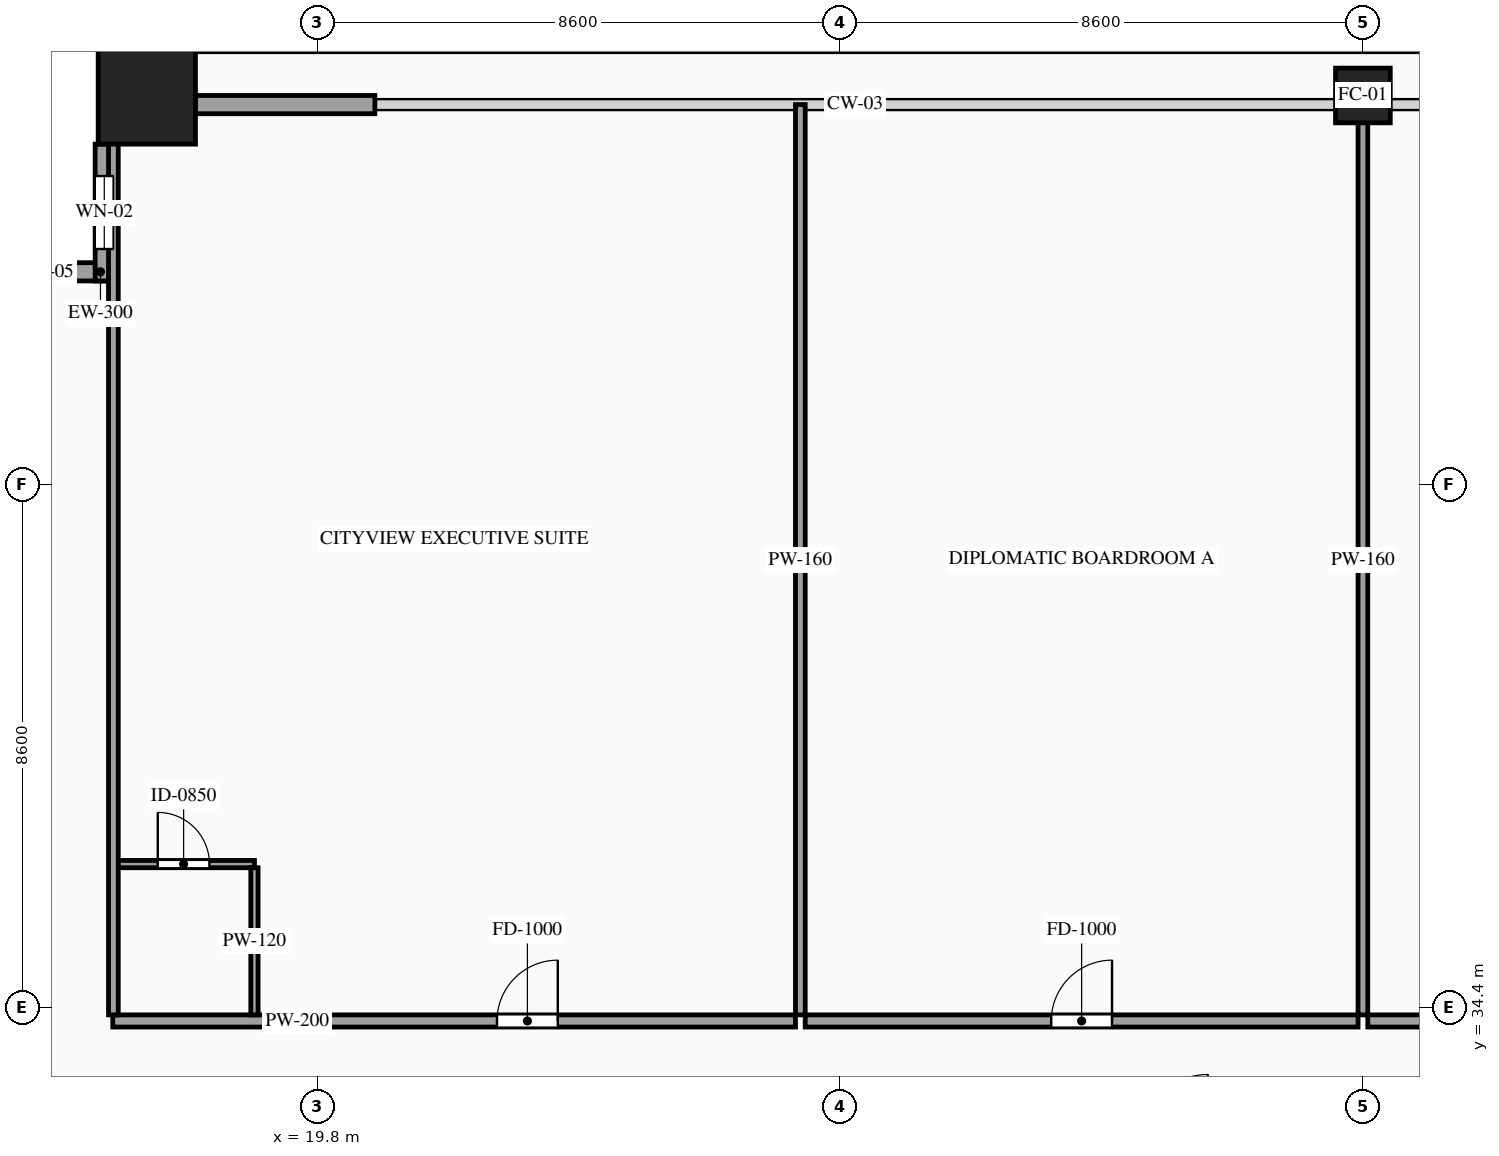
"""IFC4 building model, lengths in metres.
Left out: names, types, materials, properties, quantities, classifications, styles, units other than length and angle.
Written with IfcOpenShell. Run it as: python <this file> out.ifc"""

import sys

from ifc_helpers import new_model, si_unit, direction, frame, frame_2d, origin, origin_2d, place, context, subcontext, project, spatial, rectangle, hollow_rectangle, extrude, source, transform, mapped, element, fill, save


model = new_model("IFC4")
c1 = context("Model", 3, precision=1e-05, world=origin(), true_north=direction((0.0, 1.0)))
c2 = subcontext(c1, "Body", "Model", "MODEL_VIEW")
j1 = project(units=[si_unit("LENGTHUNIT", "METRE"), si_unit("PLANEANGLEUNIT", "RADIAN")], contexts=[c1])
p1 = place(None, origin())
s1 = spatial("IfcSite", under=j1, at=p1, CompositionType="ELEMENT")
p2 = place(p1, origin())
s2 = spatial("IfcBuilding", under=s1, at=p2, CompositionType="ELEMENT")
p3 = place(p2, frame((0.0, 0.0, 101.0)))
s3 = spatial("IfcBuildingStorey", under=s2, at=p3, CompositionType="ELEMENT", Elevation=101.0)
m1 = source(origin(), c2, "Body", "SweptSolid", [
    extrude(hollow_rectangle(XDim=1.6, YDim=1.6, WallThickness=0.07, at=origin_2d()), origin(), (0.0, 0.0, 1.0), 3.6),
])
p4 = place(p3, frame((17.0, 49.4, 0.0), z_axis=(0.0, 0.0, 1.0), x_axis=(1.0, 0.0, 0.0)))
e1 = element("IfcColumn", 1, at=p4, inside=s3, PredefinedType="COLUMN", context=c2, shape_type="MappedRepresentation", body=[
    mapped(m1, transform((0.0, 0.0, 0.0), scale=1.0)),
])
m2 = source(origin(), c2, "Body", "SweptSolid", [
    extrude(hollow_rectangle(XDim=0.9, YDim=0.9, WallThickness=0.042, at=origin_2d()), origin(), (0.0, 0.0, 1.0), 3.6),
])
p5 = place(p3, frame((37.0, 49.4, 0.0), z_axis=(0.0, 0.0, 1.0), x_axis=(1.0, 0.0, 0.0)))
e2 = element("IfcColumn", 2, at=p5, inside=s3, PredefinedType="COLUMN", context=c2, shape_type="MappedRepresentation", body=[
    mapped(m2, transform((0.0, 0.0, 0.0), scale=1.0)),
])
p6 = place(p3, frame((16.45, 46.5, 0.0), z_axis=(0.0, 0.0, 1.0), x_axis=(-1.0, 0.0, 0.0)))
e3 = element("IfcWall", 3, at=p6, inside=s3, PredefinedType="SOLIDWALL", context=c2, shape_type="SweptSolid", body=[
    extrude(rectangle(XDim=2.25, YDim=0.3, at=frame_2d((1.125, 0.0))), origin(), (0.0, 0.0, 1.0), 3.38),
])
p7 = place(p6, frame((0.675, 0.0, 0.85)))
e4 = element("IfcOpeningElement", 4, at=p7, cuts=e3, PredefinedType="OPENING", context=c2, shape_type="SweptSolid", body=[
    extrude(rectangle(XDim=0.9, YDim=1.5, at=frame_2d((0.45, 0.75))), frame((0.0, 0.165, 0.0), z_axis=(0.0, -1.0, 0.0), x_axis=(1.0, 0.0, 0.0)), (0.0, 0.0, 1.0), 0.33),
])
p8 = place(p3, frame((16.3, 48.6, 0.0), z_axis=(0.0, 0.0, 1.0), x_axis=(0.0, -1.0, 0.0)))
e5 = element("IfcWall", 5, at=p8, inside=s3, PredefinedType="SOLIDWALL", context=c2, shape_type="SweptSolid", body=[
    extrude(rectangle(XDim=2.25, YDim=0.3, at=frame_2d((1.125, 0.0))), origin(), (0.0, 0.0, 1.0), 3.38),
])
p9 = place(p8, frame((0.525, 0.0, 0.85)))
e6 = element("IfcOpeningElement", 6, at=p9, cuts=e5, PredefinedType="OPENING", context=c2, shape_type="SweptSolid", body=[
    extrude(rectangle(XDim=1.2, YDim=2.1, at=frame_2d((0.6, 1.05))), frame((0.0, 0.165, 0.0), z_axis=(0.0, -1.0, 0.0), x_axis=(1.0, 0.0, 0.0)), (0.0, 0.0, 1.0), 0.33),
])
m3 = source(origin(), c2, "Body", "SweptSolid", [
    extrude(rectangle(XDim=2.95, YDim=0.3, at=frame_2d((1.475, 0.0))), origin(), (0.0, 0.0, 1.0), 2.775),
])
p10 = place(p3, frame((17.8, 49.25, 0.0), z_axis=(0.0, 0.0, 1.0), x_axis=(1.0, 0.0, 0.0)))
e7 = element("IfcWall", 7, at=p10, inside=s3, PredefinedType="SOLIDWALL", context=c2, shape_type="MappedRepresentation", body=[
    mapped(m3, transform((0.0, 0.0, 0.0), scale=1.0)),
])
p11 = place(p3, frame((16.44, 34.18, 0.0), z_axis=(0.0, 0.0, 1.0), x_axis=(1.0, 0.0, 0.0)))
e8 = element("IfcWall", 8, at=p11, inside=s3, PredefinedType="PARTITIONING", context=c2, shape_type="SweptSolid", body=[
    extrude(rectangle(XDim=11.228, YDim=0.2, at=frame_2d((5.614, 0.0))), origin(), (0.0, 0.0, 1.0), 3.38),
])
p12 = place(p11, frame((6.319, 0.0, 0.0)))
e9 = element("IfcOpeningElement", 9, at=p12, cuts=e8, PredefinedType="OPENING", context=c2, shape_type="SweptSolid", body=[
    extrude(rectangle(XDim=1.0, YDim=2.2, at=frame_2d((0.5, 1.1))), frame((0.0, 0.115, 0.0), z_axis=(0.0, -1.0, 0.0), x_axis=(1.0, 0.0, 0.0)), (0.0, 0.0, 1.0), 0.23),
])
m4 = source(origin(), c2, "Body", "SweptSolid", [
    extrude(rectangle(XDim=14.97, YDim=0.16, at=frame_2d((7.485, 0.0))), origin(), (0.0, 0.0, 1.0), 3.38),
])
p13 = place(p3, frame((27.748, 34.28, 0.0), z_axis=(0.0, 0.0, 1.0), x_axis=(0.0, 1.0, 0.0)))
e10 = element("IfcWall", 10, at=p13, inside=s3, PredefinedType="PARTITIONING", context=c2, shape_type="MappedRepresentation", body=[
    mapped(m4, transform((0.0, 0.0, 0.0), scale=1.0)),
])
p14 = place(p3, frame((16.44, 36.76, 0.0), z_axis=(0.0, 0.0, 1.0), x_axis=(1.0, 0.0, 0.0)))
e11 = element("IfcWall", 11, at=p14, inside=s3, PredefinedType="PARTITIONING", context=c2, shape_type="SweptSolid", body=[
    extrude(rectangle(XDim=2.33, YDim=0.12, at=frame_2d((1.165, 0.0))), origin(), (0.0, 0.0, 1.0), 3.38),
])
p15 = place(p14, frame((0.74, 0.0, 0.0)))
e12 = element("IfcOpeningElement", 12, at=p15, cuts=e11, PredefinedType="OPENING", context=c2, shape_type="SweptSolid", body=[
    extrude(rectangle(XDim=0.85, YDim=2.1, at=frame_2d((0.425, 1.05))), frame((0.0, 0.075, 0.0), z_axis=(0.0, -1.0, 0.0), x_axis=(1.0, 0.0, 0.0)), (0.0, 0.0, 1.0), 0.15),
])
m5 = source(origin(), c2, "Body", "SweptSolid", [
    extrude(rectangle(XDim=2.42, YDim=0.12, at=frame_2d((1.21, 0.0))), origin(), (0.0, 0.0, 1.0), 3.38),
])
p16 = place(p3, frame((18.77, 34.28, 0.0), z_axis=(0.0, 0.0, 1.0), x_axis=(0.0, 1.0, 0.0)))
e13 = element("IfcWall", 13, at=p16, inside=s3, PredefinedType="PARTITIONING", context=c2, shape_type="MappedRepresentation", body=[
    mapped(m5, transform((0.0, 0.0, 0.0), scale=1.0)),
])
p17 = place(p3, frame((27.828, 34.18, 0.0), z_axis=(0.0, 0.0, 1.0), x_axis=(1.0, 0.0, 0.0)))
e14 = element("IfcWall", 14, at=p17, inside=s3, PredefinedType="PARTITIONING", context=c2, shape_type="SweptSolid", body=[
    extrude(rectangle(XDim=9.092, YDim=0.2, at=frame_2d((4.546, 0.0))), origin(), (0.0, 0.0, 1.0), 3.38),
])
p18 = place(p17, frame((4.046, 0.0, 0.0)))
e15 = element("IfcOpeningElement", 15, at=p18, cuts=e14, PredefinedType="OPENING", context=c2, shape_type="SweptSolid", body=[
    extrude(rectangle(XDim=1.0, YDim=2.2, at=frame_2d((0.5, 1.1))), frame((0.0, 0.115, 0.0), z_axis=(0.0, -1.0, 0.0), x_axis=(1.0, 0.0, 0.0)), (0.0, 0.0, 1.0), 0.23),
])
m6 = source(origin(), c2, "Body", "SweptSolid", [
    extrude(rectangle(XDim=14.97, YDim=0.16, at=frame_2d((7.485, 0.0))), origin(), (0.0, 0.0, 1.0), 2.675),
])
p19 = place(p3, frame((37.0, 34.28, 0.0), z_axis=(0.0, 0.0, 1.0), x_axis=(0.0, 1.0, 0.0)))
e16 = element("IfcWall", 16, at=p19, inside=s3, PredefinedType="PARTITIONING", context=c2, shape_type="MappedRepresentation", body=[
    mapped(m6, transform((0.0, 0.0, 0.0), scale=1.0)),
])
p20 = place(p3, frame((37.08, 34.18, 0.0), z_axis=(0.0, 0.0, 1.0), x_axis=(1.0, 0.0, 0.0)))
e17 = element("IfcWall", 17, at=p20, inside=s3, PredefinedType="PARTITIONING", context=c2, shape_type="SweptSolid", body=[
    extrude(rectangle(XDim=11.148, YDim=0.2, at=frame_2d((5.574, 0.0))), origin(), (0.0, 0.0, 1.0), 3.38),
])
p21 = place(p20, frame((5.074, 0.0, 0.0)))
e18 = element("IfcOpeningElement", 18, at=p21, cuts=e17, PredefinedType="OPENING", context=c2, shape_type="SweptSolid", body=[
    extrude(rectangle(XDim=1.0, YDim=2.2, at=frame_2d((0.5, 1.1))), frame((0.0, 0.115, 0.0), z_axis=(0.0, -1.0, 0.0), x_axis=(1.0, 0.0, 0.0)), (0.0, 0.0, 1.0), 0.23),
])
m7 = source(origin(), c2, "Body", "SweptSolid", [
    extrude(rectangle(XDim=14.82, YDim=0.16, at=frame_2d((7.41, 0.0))), origin(), (0.0, 0.0, 1.0), 3.38),
])
p22 = place(p3, frame((16.45, 34.28, 0.0), z_axis=(0.0, 0.0, 1.0), x_axis=(0.0, 1.0, 0.0)))
e19 = element("IfcWall", 19, at=p22, inside=s3, PredefinedType="PARTITIONING", context=c2, shape_type="MappedRepresentation", body=[
    mapped(m7, transform((0.0, 0.0, 0.0), scale=1.0)),
])
m8 = source(origin(), c2, "Body", "SweptSolid", [
    extrude(rectangle(XDim=0.9, YDim=1.5, at=frame_2d((0.45, 0.75))), frame((0.0, 0.03, 0.0), z_axis=(0.0, -1.0, 0.0), x_axis=(1.0, 0.0, 0.0)), (0.0, 0.0, 1.0), 0.06),
])
p23 = place(p7, origin())
e20 = element("IfcWindow", 20, at=p23, inside=s3, PartitioningType="SINGLE_PANEL", PredefinedType="WINDOW", context=c2, shape_type="MappedRepresentation", body=[
    mapped(m8, transform((0.0, 0.0, 0.0), scale=1.0)),
])
fill(e4, e20)
m9 = source(origin(), c2, "Body", "SweptSolid", [
    extrude(rectangle(XDim=1.2, YDim=2.1, at=frame_2d((0.6, 1.05))), frame((0.0, 0.03, 0.0), z_axis=(0.0, -1.0, 0.0), x_axis=(1.0, 0.0, 0.0)), (0.0, 0.0, 1.0), 0.06),
])
p24 = place(p9, origin())
e21 = element("IfcWindow", 21, at=p24, inside=s3, PartitioningType="SINGLE_PANEL", PredefinedType="WINDOW", context=c2, shape_type="MappedRepresentation", body=[
    mapped(m9, transform((0.0, 0.0, 0.0), scale=1.0)),
])
fill(e6, e21)
m10 = source(origin(), c2, "Body", "SweptSolid", [
    extrude(rectangle(XDim=1.0, YDim=2.2, at=frame_2d((0.5, 1.1))), frame((0.0, 0.025, 0.0), z_axis=(0.0, -1.0, 0.0), x_axis=(1.0, 0.0, 0.0)), (0.0, 0.0, 1.0), 0.05),
])
p25 = place(p12, origin())
e22 = element("IfcDoor", 22, at=p25, inside=s3, OperationType="SINGLE_SWING_RIGHT", PredefinedType="DOOR", context=c2, shape_type="MappedRepresentation", body=[
    mapped(m10, transform((0.0, 0.0, 0.0), scale=1.0)),
])
fill(e9, e22)
m11 = source(origin(), c2, "Body", "SweptSolid", [
    extrude(rectangle(XDim=0.85, YDim=2.1, at=frame_2d((0.425, 1.05))), frame((0.0, 0.025, 0.0), z_axis=(0.0, -1.0, 0.0), x_axis=(1.0, 0.0, 0.0)), (0.0, 0.0, 1.0), 0.05),
])
p26 = place(p15, origin())
e23 = element("IfcDoor", 23, at=p26, inside=s3, OperationType="SINGLE_SWING_LEFT", PredefinedType="DOOR", context=c2, shape_type="MappedRepresentation", body=[
    mapped(m11, transform((0.0, 0.0, 0.0), scale=1.0)),
])
fill(e12, e23)
p27 = place(p18, origin())
e24 = element("IfcDoor", 24, at=p27, inside=s3, OperationType="SINGLE_SWING_RIGHT", PredefinedType="DOOR", context=c2, shape_type="MappedRepresentation", body=[
    mapped(m10, transform((0.0, 0.0, 0.0), scale=1.0)),
])
fill(e15, e24)
save(model, sys.argv[1])
